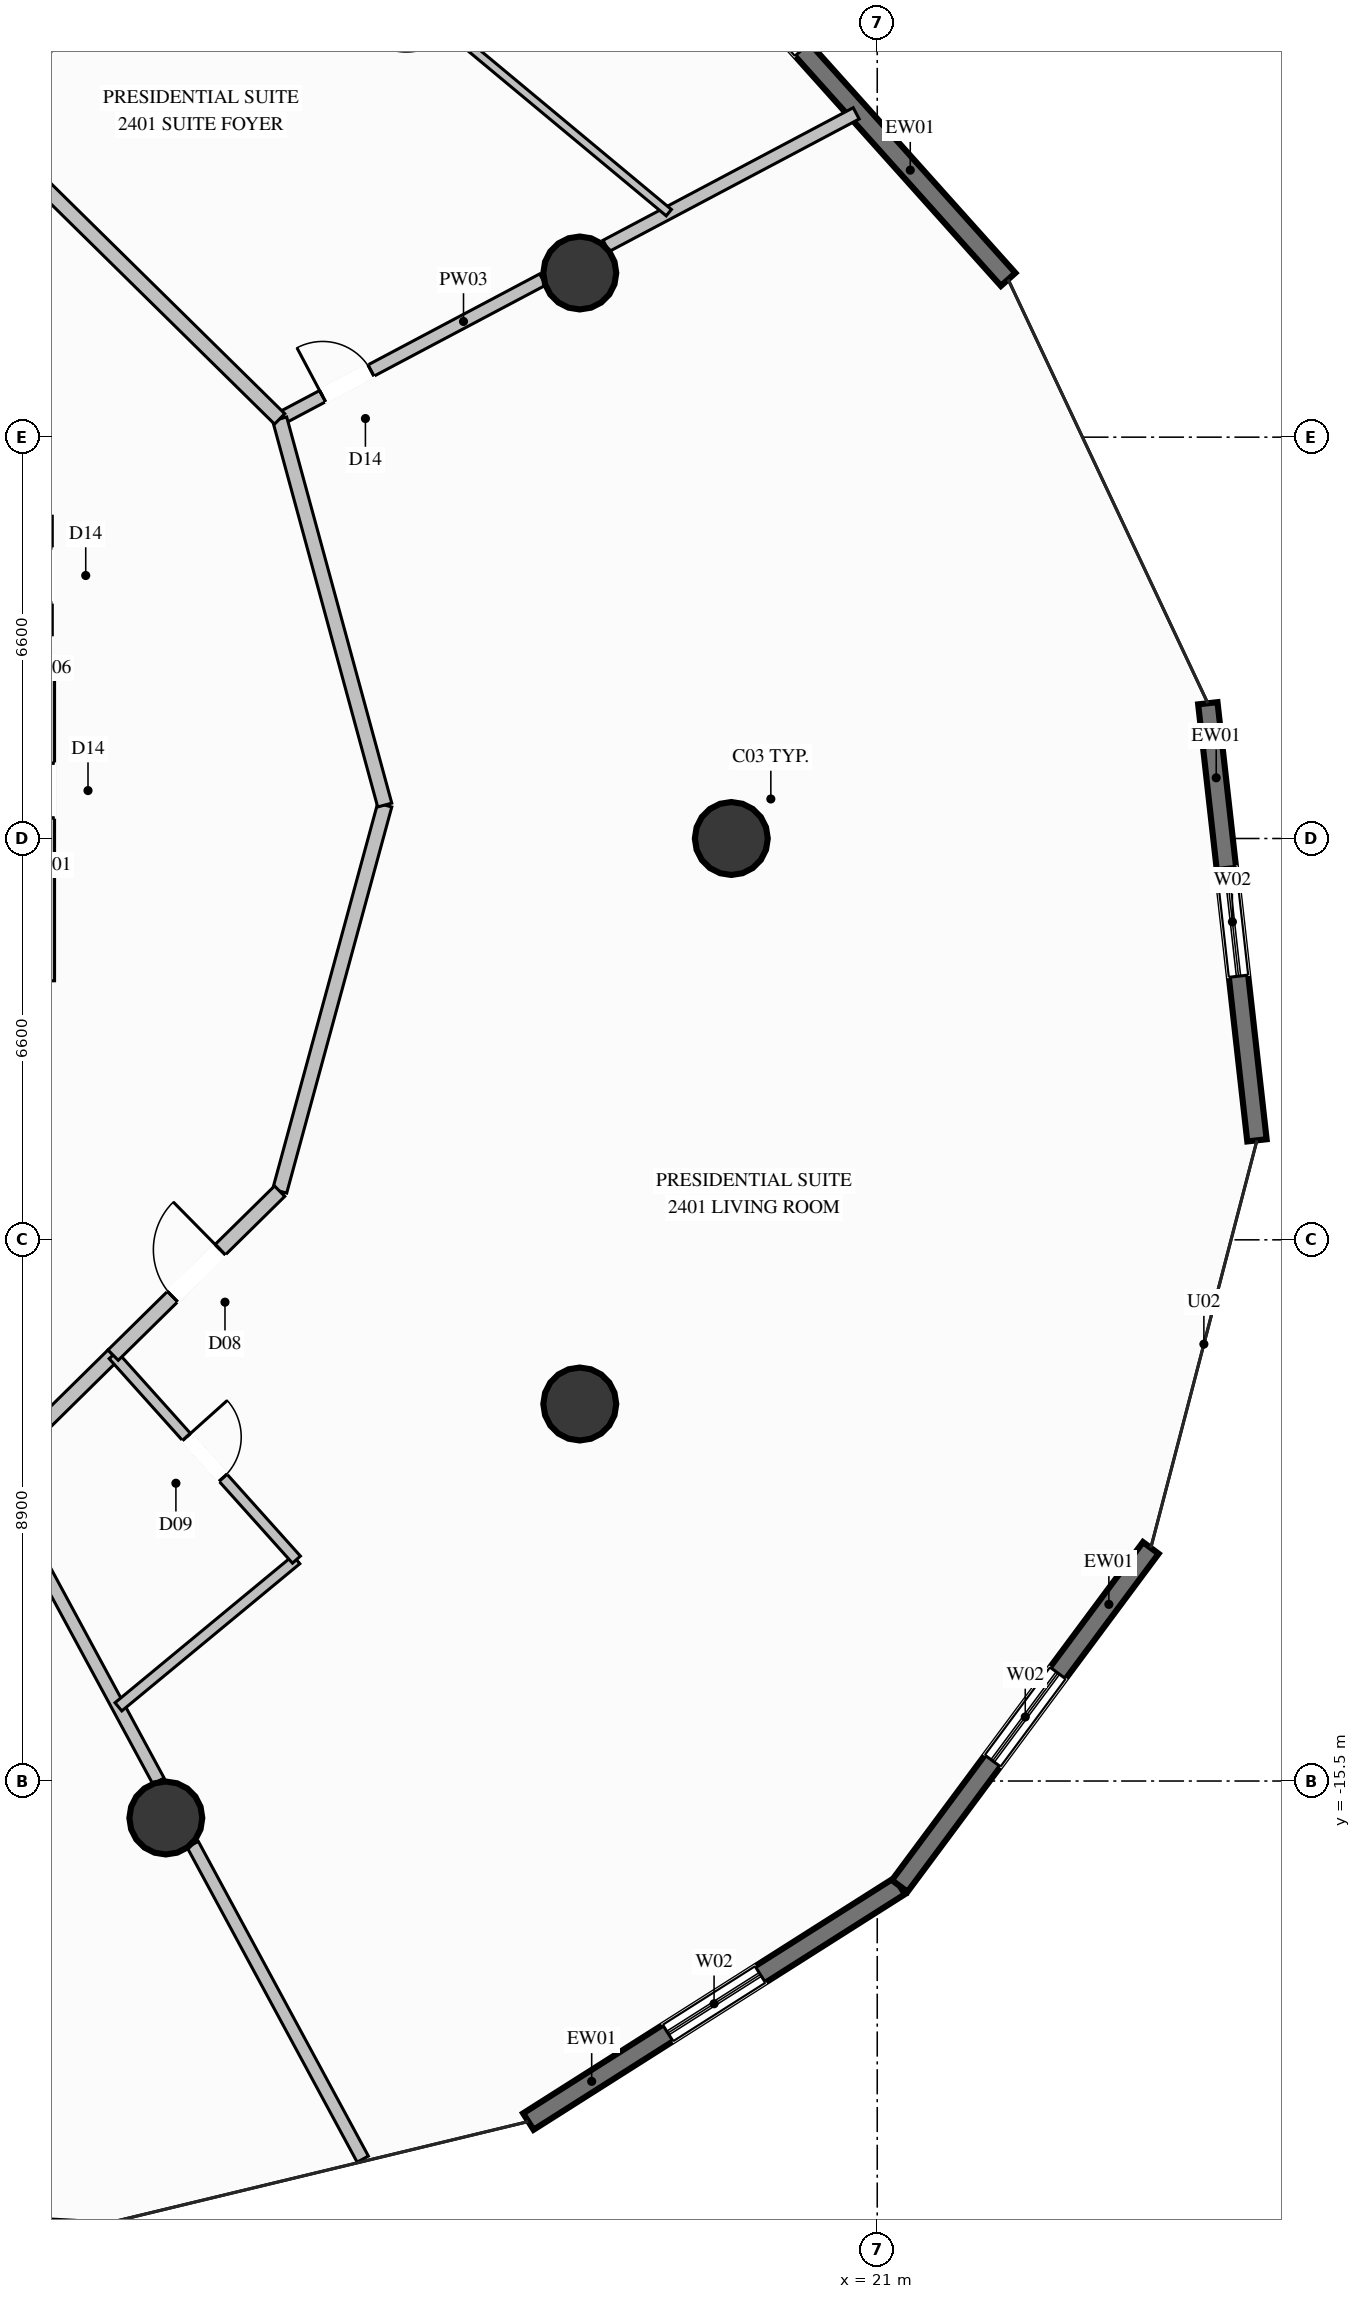
"""IFC4 building model, lengths in metres.
Left out: names, types, materials, properties, quantities, classifications, styles, units other than length and angle.
Written with IfcOpenShell. Run it as: python <this file> out.ifc"""

import sys

from ifc_helpers import new_model, si_unit, direction, frame, frame_2d, origin, origin_2d, place, context, subcontext, project, spatial, rectangle, circle, extrude, element, fill, save


model = new_model("IFC4")
c1 = context("Model", 3, precision=1e-05, world=origin(), true_north=direction((0.0, 1.0)))
c2 = subcontext(c1, "Body", "Model", "MODEL_VIEW")
j1 = project(units=[si_unit("LENGTHUNIT", "METRE"), si_unit("PLANEANGLEUNIT", "RADIAN")], contexts=[c1])
p1 = place(None, origin())
s1 = spatial("IfcSite", under=j1, at=p1, CompositionType="ELEMENT")
p2 = place(p1, origin())
s2 = spatial("IfcBuilding", under=s1, at=p2, CompositionType="ELEMENT")
p3 = place(p2, frame((0.0, 0.0, 89.6)))
s3 = spatial("IfcBuildingStorey", under=s2, at=p3, CompositionType="ELEMENT", Elevation=89.6)
for number, where, z_axis, x_axis in (
    (1, (18.6, 0.0, 0.0), (0.0, 0.0, 1.0), (1.0, 0.0, 0.0)),
    (2, (16.108, 9.3, 0.0), (0.0, 0.0, 1.0), (1.0, 0.0, 0.0)),
    (3, (9.3, -16.108, 0.0), (0.0, 0.0, 1.0), (1.0, 0.0, 0.0)),
    (4, (16.108, -9.3, 0.0), (0.0, 0.0, 1.0), (1.0, 0.0, 0.0)),
):
    element("IfcColumn", number, at=place(p3, frame(where, z_axis=z_axis, x_axis=x_axis)), inside=s3, PredefinedType="COLUMN", context=c2, shape_type="SweptSolid", body=[
        extrude(circle(Radius=0.6, at=origin_2d()), origin(), (0.0, 0.0, 1.0), 3.6),
    ])
p4 = place(p3, frame((26.437, 2.224, 0.0), z_axis=(0.0, 0.0, 1.0), x_axis=(0.111716865036, -0.99374007772, 0.0)))
e5 = element("IfcWall", 5, at=p4, inside=s3, PredefinedType="SOLIDWALL", context=c2, shape_type="SweptSolid", body=[
    extrude(rectangle(XDim=7.233, YDim=0.32, at=frame_2d((3.617, 0.0))), origin(), (0.0, 0.0, 1.0), 3.2),
])
p5 = place(p4, frame((2.717, 0.0, 0.35)))
e6 = element("IfcOpeningElement", 6, at=p5, cuts=e5, PredefinedType="OPENING", context=c2, shape_type="SweptSolid", body=[
    extrude(rectangle(XDim=1.8, YDim=2.6, at=frame_2d((0.9, 1.3))), frame((0.0, 0.17, 0.0), z_axis=(0.0, -1.0, 0.0), x_axis=(1.0, 0.0, 0.0)), (0.0, 0.0, 1.0), 0.34),
])
p6 = place(p3, frame((17.715, 15.264, 0.0), z_axis=(0.0, 0.0, 1.0), x_axis=(0.667278098427, -0.744808659563, 0.0)))
e7 = element("IfcWall", 7, at=p6, inside=s3, PredefinedType="SOLIDWALL", context=c2, shape_type="SweptSolid", body=[
    extrude(rectangle(XDim=8.149, YDim=0.32, at=frame_2d((4.075, 0.0))), origin(), (0.0, 0.0, 1.0), 3.2),
])
p7 = place(p6, frame((1.274, 0.0, 0.35)))
e8 = element("IfcOpeningElement", 8, at=p7, cuts=e7, PredefinedType="OPENING", context=c2, shape_type="SweptSolid", body=[
    extrude(rectangle(XDim=1.8, YDim=2.6, at=frame_2d((0.9, 1.3))), frame((0.0, 0.17, 0.0), z_axis=(0.0, -1.0, 0.0), x_axis=(1.0, 0.0, 0.0)), (0.0, 0.0, 1.0), 0.34),
])
p8 = place(p3, frame((7.772, -22.908, 0.0), z_axis=(0.0, 0.0, 1.0), x_axis=(-0.998582015263, 0.053234939583, 0.0)))
e9 = element("IfcWall", 9, at=p8, inside=s3, PredefinedType="SOLIDWALL", context=c2, shape_type="SweptSolid", body=[
    extrude(rectangle(XDim=8.149, YDim=0.32, at=frame_2d((4.075, 0.0))), origin(), (0.0, 0.0, 1.0), 3.2),
])
p9 = place(p8, frame((2.943, 0.0, 0.35)))
e10 = element("IfcOpeningElement", 10, at=p9, cuts=e9, PredefinedType="OPENING", context=c2, shape_type="SweptSolid", body=[
    extrude(rectangle(XDim=1.8, YDim=2.6, at=frame_2d((0.9, 1.3))), frame((0.0, 0.17, 0.0), z_axis=(0.0, -1.0, 0.0), x_axis=(1.0, 0.0, 0.0)), (0.0, 0.0, 1.0), 0.34),
])
p10 = place(p3, frame((21.37, -17.226, 0.0), z_axis=(0.0, 0.0, 1.0), x_axis=(-0.844473577477, -0.535597215213, 0.0)))
e11 = element("IfcWall", 11, at=p10, inside=s3, PredefinedType="SOLIDWALL", context=c2, shape_type="SweptSolid", body=[
    extrude(rectangle(XDim=7.233, YDim=0.32, at=frame_2d((3.617, 0.0))), origin(), (0.0, 0.0, 1.0), 3.2),
])
p11 = place(p10, frame((2.716, 0.0, 0.35)))
e12 = element("IfcOpeningElement", 12, at=p11, cuts=e11, PredefinedType="OPENING", context=c2, shape_type="SweptSolid", body=[
    extrude(rectangle(XDim=1.8, YDim=2.6, at=frame_2d((0.9, 1.3))), frame((0.0, 0.17, 0.0), z_axis=(0.0, -1.0, 0.0), x_axis=(1.0, 0.0, 0.0)), (0.0, 0.0, 1.0), 0.34),
])
p12 = place(p3, frame((25.499, -11.666, 0.0), z_axis=(0.0, 0.0, 1.0), x_axis=(-0.596191587438, -0.80284219562, 0.0)))
e13 = element("IfcWall", 13, at=p12, inside=s3, PredefinedType="SOLIDWALL", context=c2, shape_type="SweptSolid", body=[
    extrude(rectangle(XDim=6.926, YDim=0.32, at=frame_2d((3.463, 0.0))), origin(), (0.0, 0.0, 1.0), 3.2),
])
p13 = place(p12, frame((2.563, 0.0, 0.35)))
e14 = element("IfcOpeningElement", 14, at=p13, cuts=e13, PredefinedType="OPENING", context=c2, shape_type="SweptSolid", body=[
    extrude(rectangle(XDim=1.8, YDim=2.6, at=frame_2d((0.9, 1.3))), frame((0.0, 0.17, 0.0), z_axis=(0.0, -1.0, 0.0), x_axis=(1.0, 0.0, 0.0)), (0.0, 0.0, 1.0), 0.34),
])
p14 = place(p3, frame((7.35, -2.34, 0.0), z_axis=(0.0, 0.0, 1.0), x_axis=(0.0, 1.0, 0.0)))
e15 = element("IfcWall", 15, at=p14, inside=s3, PredefinedType="PARTITIONING", context=c2, shape_type="SweptSolid", body=[
    extrude(rectangle(XDim=5.02, YDim=0.24, at=frame_2d((2.51, 0.0))), origin(), (0.0, 0.0, 1.0), 3.2),
])
p15 = place(p14, frame((2.678, 0.0, 0.0)))
e16 = element("IfcOpeningElement", 16, at=p15, cuts=e15, PredefinedType="OPENING", context=c2, shape_type="SweptSolid", body=[
    extrude(rectangle(XDim=0.9, YDim=2.02, at=frame_2d((0.45, 1.01))), frame((0.0, 0.13, 0.0), z_axis=(0.0, -1.0, 0.0), x_axis=(1.0, 0.0, 0.0)), (0.0, 0.0, 1.0), 0.26),
])
p16 = place(p3, frame((11.172, 6.9, 0.0), z_axis=(0.0, 0.0, 1.0), x_axis=(0.883592505471, 0.468256643599, 0.0)))
e17 = element("IfcWall", 17, at=p16, inside=s3, PredefinedType="PARTITIONING", context=c2, shape_type="SweptSolid", body=[
    extrude(rectangle(XDim=4.895, YDim=0.21, at=frame_2d((2.447, 0.0))), origin(), (0.0, 0.0, 1.0), 2.067),
])
p17 = place(p16, frame((0.799, 0.0, 0.0)))
e18 = element("IfcOpeningElement", 18, at=p17, cuts=e17, PredefinedType="OPENING", context=c2, shape_type="SweptSolid", body=[
    extrude(rectangle(XDim=0.9, YDim=2.02, at=frame_2d((0.45, 1.01))), frame((0.0, 0.115, 0.0), z_axis=(0.0, -1.0, 0.0), x_axis=(1.0, 0.0, 0.0)), (0.0, 0.0, 1.0), 0.23),
])
p18 = place(p3, frame((16.54, 9.745, 0.0), z_axis=(0.0, 0.0, 1.0), x_axis=(0.883616940901, 0.468210531441, 0.0)))
e19 = element("IfcWall", 19, at=p18, inside=s3, PredefinedType="PARTITIONING", context=c2, shape_type="SweptSolid", body=[
    extrude(rectangle(XDim=4.656, YDim=0.21, at=frame_2d((2.328, 0.0))), origin(), (0.0, 0.0, 1.0), 3.2),
])
p19 = place(p3, frame((6.45, 11.549, 0.0), z_axis=(0.0, 0.0, 1.0), x_axis=(0.517538966695, 0.855659639081, 0.0)))
e20 = element("IfcWall", 20, at=p19, inside=s3, PredefinedType="PARTITIONING", context=c2, shape_type="SweptSolid", body=[
    extrude(rectangle(XDim=4.761, YDim=0.21, at=frame_2d((2.381, 0.0))), origin(), (0.0, 0.0, 1.0), 2.067),
])
p20 = place(p3, frame((6.45, -10.449, 0.0), z_axis=(0.0, 0.0, 1.0), x_axis=(0.475344473231, -0.879799767998, 0.0)))
e21 = element("IfcWall", 21, at=p20, inside=s3, PredefinedType="PARTITIONING", context=c2, shape_type="SweptSolid", body=[
    extrude(rectangle(XDim=5.741, YDim=0.21, at=frame_2d((2.871, 0.0))), origin(), (0.0, 0.0, 1.0), 2.067),
])
p21 = place(p3, frame((9.742, -16.542, 0.0), z_axis=(0.0, 0.0, 1.0), x_axis=(0.475420692092, -0.879758583664, 0.0)))
e22 = element("IfcWall", 22, at=p21, inside=s3, PredefinedType="PARTITIONING", context=c2, shape_type="SweptSolid", body=[
    extrude(rectangle(XDim=5.884, YDim=0.21, at=frame_2d((2.942, 0.0))), origin(), (0.0, 0.0, 1.0), 3.2),
])
p22 = place(p3, frame((6.45, -10.449, 0.0), z_axis=(0.0, 0.0, 1.0), x_axis=(0.712524314294, 0.701647419677, 0.0)))
e23 = element("IfcWall", 23, at=p22, inside=s3, PredefinedType="PARTITIONING", context=c2, shape_type="SweptSolid", body=[
    extrude(rectangle(XDim=2.783, YDim=0.24, at=frame_2d((1.392, 0.0))), origin(), (0.0, 0.0, 1.0), 3.2),
])
p23 = place(p3, frame((8.52, -14.28, 0.0), z_axis=(0.0, 0.0, 1.0), x_axis=(0.770654375428, 0.637253351215, 0.0)))
e24 = element("IfcWall", 24, at=p23, inside=s3, PredefinedType="PLUMBINGWALL", context=c2, shape_type="SweptSolid", body=[
    extrude(rectangle(XDim=3.799, YDim=0.175, at=frame_2d((1.9, 0.0))), origin(), (0.0, 0.0, 1.0), 3.2),
])
p24 = place(p3, frame((8.433, -8.496, 0.0), z_axis=(0.0, 0.0, 1.0), x_axis=(0.667541915613, -0.74457222007, 0.0)))
e25 = element("IfcWall", 25, at=p24, inside=s3, PredefinedType="PLUMBINGWALL", context=c2, shape_type="SweptSolid", body=[
    extrude(rectangle(XDim=4.516, YDim=0.175, at=frame_2d((2.258, 0.0))), origin(), (0.0, 0.0, 1.0), 3.2),
])
p25 = place(p24, frame((1.808, 0.0, 0.0)))
e26 = element("IfcOpeningElement", 26, at=p25, cuts=e25, PredefinedType="OPENING", context=c2, shape_type="SweptSolid", body=[
    extrude(rectangle(XDim=0.9, YDim=2.1, at=frame_2d((0.45, 1.05))), frame((0.0, 0.098, 0.0), z_axis=(0.0, -1.0, 0.0), x_axis=(1.0, 0.0, 0.0)), (0.0, 0.0, 1.0), 0.195),
])
p26 = place(p3, frame((11.172, -5.8, 0.0), z_axis=(0.0, 0.0, 1.0), x_axis=(0.262542910092, 0.964920318141, 0.0)))
e27 = element("IfcWall", 27, at=p26, inside=s3, PredefinedType="PARTITIONING", context=c2, shape_type="SweptSolid", body=[
    extrude(rectangle(XDim=6.581, YDim=0.24, at=frame_2d((3.291, 0.0))), origin(), (0.0, 0.0, 1.0), 3.2),
])
p27 = place(p3, frame((12.9, 0.55, 0.0), z_axis=(0.0, 0.0, 1.0), x_axis=(-0.262552308576, 0.96491776088, 0.0)))
e28 = element("IfcWall", 28, at=p27, inside=s3, PredefinedType="PARTITIONING", context=c2, shape_type="SweptSolid", body=[
    extrude(rectangle(XDim=6.581, YDim=0.24, at=frame_2d((3.291, 0.0))), origin(), (0.0, 0.0, 1.0), 3.2),
])
p28 = place(p3, frame((8.433, -8.496, 0.0), z_axis=(0.0, 0.0, 1.0), x_axis=(0.712674788685, 0.70149457986, 0.0)))
e29 = element("IfcWall", 29, at=p28, inside=s3, PredefinedType="PARTITIONING", context=c2, shape_type="SweptSolid", body=[
    extrude(rectangle(XDim=3.843, YDim=0.24, at=frame_2d((1.922, 0.0))), origin(), (0.0, 0.0, 1.0), 3.2),
])
p29 = place(p28, frame((1.372, 0.0, 0.0)))
e30 = element("IfcOpeningElement", 30, at=p29, cuts=e29, PredefinedType="OPENING", context=c2, shape_type="SweptSolid", body=[
    extrude(rectangle(XDim=1.1, YDim=2.3, at=frame_2d((0.55, 1.15))), frame((0.0, 0.13, 0.0), z_axis=(0.0, -1.0, 0.0), x_axis=(1.0, 0.0, 0.0)), (0.0, 0.0, 1.0), 0.26),
])
p30 = place(p3, frame((11.172, 6.9, 0.0), z_axis=(0.0, 0.0, 1.0), x_axis=(-0.712593171801, 0.701577487882, 0.0)))
e31 = element("IfcWall", 31, at=p30, inside=s3, PredefinedType="PARTITIONING", context=c2, shape_type="SweptSolid", body=[
    extrude(rectangle(XDim=6.627, YDim=0.24, at=frame_2d((3.313, 0.0))), origin(), (0.0, 0.0, 1.0), 3.2),
])
p31 = place(p3, frame((17.572, 10.292, 0.0), z_axis=(0.0, 0.0, 1.0), x_axis=(-0.768736797736, 0.639565270951, 0.0)))
e32 = element("IfcWall", 32, at=p31, inside=s3, PredefinedType="PARTITIONING", context=c2, shape_type="SweptSolid", body=[
    extrude(rectangle(XDim=10.282, YDim=0.135, at=frame_2d((5.141, 0.0))), origin(), (0.0, 0.0, 1.0), 3.2),
])
p32 = place(p31, frame((4.666, 0.0, 0.0)))
e33 = element("IfcOpeningElement", 33, at=p32, cuts=e32, PredefinedType="OPENING", context=c2, shape_type="SweptSolid", body=[
    extrude(rectangle(XDim=0.95, YDim=2.1, at=frame_2d((0.475, 1.05))), frame((0.0, 0.078, 0.0), z_axis=(0.0, -1.0, 0.0), x_axis=(1.0, 0.0, 0.0)), (0.0, 0.0, 1.0), 0.155),
])
p33 = place(p5, origin())
e34 = element("IfcWindow", 34, at=p33, inside=s3, PartitioningType="SINGLE_PANEL", PredefinedType="WINDOW", context=c2, shape_type="SweptSolid", body=[
    extrude(rectangle(XDim=1.8, YDim=2.6, at=frame_2d((0.9, 1.3))), frame((0.0, 0.03, 0.0), z_axis=(0.0, -1.0, 0.0), x_axis=(1.0, 0.0, 0.0)), (0.0, 0.0, 1.0), 0.06),
])
fill(e6, e34)
p34 = place(p11, origin())
e35 = element("IfcWindow", 35, at=p34, inside=s3, PartitioningType="SINGLE_PANEL", PredefinedType="WINDOW", context=c2, shape_type="SweptSolid", body=[
    extrude(rectangle(XDim=1.8, YDim=2.6, at=frame_2d((0.9, 1.3))), frame((0.0, 0.03, 0.0), z_axis=(0.0, -1.0, 0.0), x_axis=(1.0, 0.0, 0.0)), (0.0, 0.0, 1.0), 0.06),
])
fill(e12, e35)
p35 = place(p13, origin())
e36 = element("IfcWindow", 36, at=p35, inside=s3, PartitioningType="SINGLE_PANEL", PredefinedType="WINDOW", context=c2, shape_type="SweptSolid", body=[
    extrude(rectangle(XDim=1.8, YDim=2.6, at=frame_2d((0.9, 1.3))), frame((0.0, 0.03, 0.0), z_axis=(0.0, -1.0, 0.0), x_axis=(1.0, 0.0, 0.0)), (0.0, 0.0, 1.0), 0.06),
])
fill(e14, e36)
p36 = place(p25, origin())
e37 = element("IfcDoor", 37, at=p36, inside=s3, OperationType="SINGLE_SWING_LEFT", PredefinedType="DOOR", context=c2, shape_type="SweptSolid", body=[
    extrude(rectangle(XDim=0.9, YDim=2.1, at=frame_2d((0.45, 1.05))), frame((0.0, 0.025, 0.0), z_axis=(0.0, -1.0, 0.0), x_axis=(1.0, 0.0, 0.0)), (0.0, 0.0, 1.0), 0.05),
])
fill(e26, e37)
p37 = place(p29, origin())
e38 = element("IfcDoor", 38, at=p37, inside=s3, OperationType="SINGLE_SWING_RIGHT", PredefinedType="DOOR", context=c2, shape_type="SweptSolid", body=[
    extrude(rectangle(XDim=1.1, YDim=2.3, at=frame_2d((0.55, 1.15))), frame((0.0, 0.025, 0.0), z_axis=(0.0, -1.0, 0.0), x_axis=(1.0, 0.0, 0.0)), (0.0, 0.0, 1.0), 0.05),
])
fill(e30, e38)
p38 = place(p17, origin())
e39 = element("IfcDoor", 39, at=p38, inside=s3, OperationType="SINGLE_SWING_LEFT", PredefinedType="DOOR", context=c2, shape_type="SweptSolid", body=[
    extrude(rectangle(XDim=0.9, YDim=2.02, at=frame_2d((0.45, 1.01))), frame((0.0, 0.025, 0.0), z_axis=(0.0, -1.0, 0.0), x_axis=(1.0, 0.0, 0.0)), (0.0, 0.0, 1.0), 0.05),
])
fill(e18, e39)
save(model, sys.argv[1])
